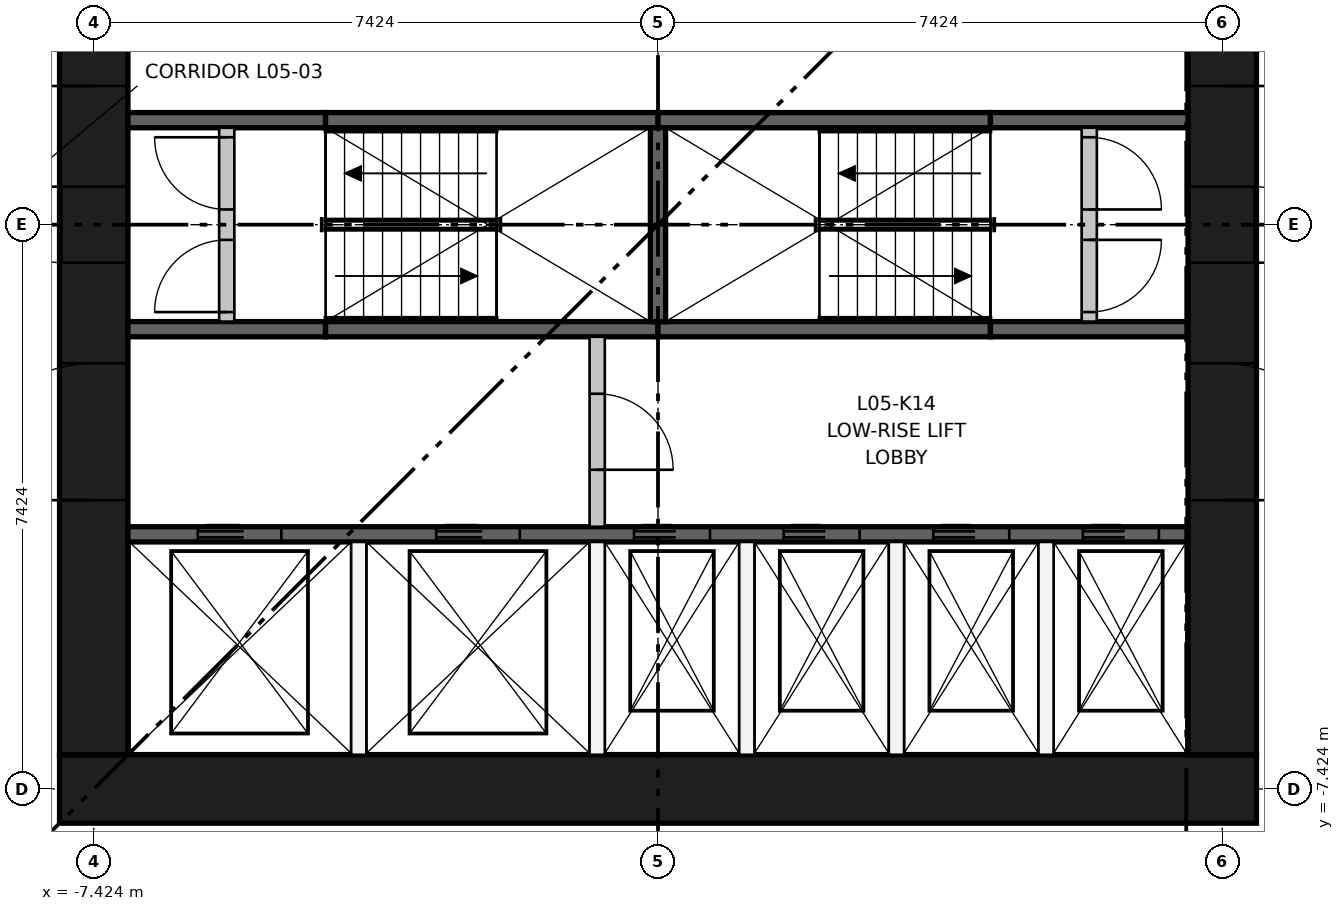
"""IFC4 building model, lengths in metres.
Left out: names, types, materials, properties, quantities, classifications, styles, units other than length and angle.
Written with IfcOpenShell. Run it as: python <this file> out.ifc"""

import sys

from ifc_helpers import new_model, si_unit, direction, frame, frame_2d, origin, place, context, subcontext, project, spatial, rectangle, extrude, element, fill, save


model = new_model("IFC4")
c1 = context("Model", 3, precision=1e-05, world=origin(), true_north=direction((0.0, 1.0)))
c2 = subcontext(c1, "Body", "Model", "MODEL_VIEW")
j1 = project(units=[si_unit("LENGTHUNIT", "METRE"), si_unit("PLANEANGLEUNIT", "RADIAN")], contexts=[c1])
p1 = place(None, origin())
s1 = spatial("IfcSite", under=j1, at=p1, CompositionType="ELEMENT")
p2 = place(p1, origin())
s2 = spatial("IfcBuilding", under=s1, at=p2, CompositionType="ELEMENT")
p3 = place(p2, frame((0.0, 0.0, 22.4)))
s3 = spatial("IfcBuildingStorey", under=s2, at=p3, CompositionType="ELEMENT", Elevation=22.4)
p4 = place(p3, frame((-7.874, -7.424, 0.0), z_axis=(0.0, 0.0, 1.0), x_axis=(1.0, 0.0, 0.0)))
e1 = element("IfcWall", 1, at=p4, inside=s3, PredefinedType="SHEAR", context=c2, shape_type="SweptSolid", body=[
    extrude(rectangle(XDim=15.748, YDim=0.9, at=frame_2d((7.874, 0.0))), origin(), (0.0, 0.0, 1.0), 3.8),
])
p5 = place(p3, frame((-7.424, -6.974, 0.0), z_axis=(0.0, 0.0, 1.0), x_axis=(0.0, 1.0, 0.0)))
e2 = element("IfcWall", 2, at=p5, inside=s3, PredefinedType="SHEAR", context=c2, shape_type="SweptSolid", body=[
    extrude(rectangle(XDim=13.948, YDim=0.9, at=frame_2d((6.974, 0.0))), origin(), (0.0, 0.0, 1.0), 3.8),
])
p6 = place(p5, frame((6.474, 0.0, 0.0)))
e3 = element("IfcOpeningElement", 3, at=p6, cuts=e2, PredefinedType="OPENING", context=c2, shape_type="SweptSolid", body=[
    extrude(rectangle(XDim=1.0, YDim=2.1, at=frame_2d((0.5, 1.05))), frame((0.0, 0.46, 0.0), z_axis=(0.0, -1.0, 0.0), x_axis=(1.0, 0.0, 0.0)), (0.0, 0.0, 1.0), 0.92),
])
p7 = place(p5, frame((3.35, 0.0, 0.0)))
e4 = element("IfcOpeningElement", 4, at=p7, cuts=e2, PredefinedType="OPENING", context=c2, shape_type="SweptSolid", body=[
    extrude(rectangle(XDim=1.8, YDim=2.1, at=frame_2d((0.9, 1.05))), frame((0.0, 0.46, 0.0), z_axis=(0.0, -1.0, 0.0), x_axis=(1.0, 0.0, 0.0)), (0.0, 0.0, 1.0), 0.92),
])
p8 = place(p5, frame((8.799, 0.0, 0.0)))
e5 = element("IfcOpeningElement", 5, at=p8, cuts=e2, PredefinedType="OPENING", context=c2, shape_type="SweptSolid", body=[
    extrude(rectangle(XDim=1.8, YDim=2.1, at=frame_2d((0.9, 1.05))), frame((0.0, 0.46, 0.0), z_axis=(0.0, -1.0, 0.0), x_axis=(1.0, 0.0, 0.0)), (0.0, 0.0, 1.0), 0.92),
])
p9 = place(p5, frame((11.974, 0.0, 0.0)))
e6 = element("IfcOpeningElement", 6, at=p9, cuts=e2, PredefinedType="OPENING", context=c2, shape_type="SweptSolid", body=[
    extrude(rectangle(XDim=1.0, YDim=2.1, at=frame_2d((0.5, 1.05))), frame((0.0, 0.46, 0.0), z_axis=(0.0, -1.0, 0.0), x_axis=(1.0, 0.0, 0.0)), (0.0, 0.0, 1.0), 0.92),
])
p10 = place(p3, frame((7.424, -6.974, 0.0), z_axis=(0.0, 0.0, 1.0), x_axis=(0.0, 1.0, 0.0)))
e7 = element("IfcWall", 7, at=p10, inside=s3, PredefinedType="SHEAR", context=c2, shape_type="SweptSolid", body=[
    extrude(rectangle(XDim=13.948, YDim=0.9, at=frame_2d((6.974, 0.0))), origin(), (0.0, 0.0, 1.0), 3.8),
])
p11 = place(p10, frame((6.474, 0.0, 0.0)))
e8 = element("IfcOpeningElement", 8, at=p11, cuts=e7, PredefinedType="OPENING", context=c2, shape_type="SweptSolid", body=[
    extrude(rectangle(XDim=1.0, YDim=2.1, at=frame_2d((0.5, 1.05))), frame((0.0, 0.46, 0.0), z_axis=(0.0, -1.0, 0.0), x_axis=(1.0, 0.0, 0.0)), (0.0, 0.0, 1.0), 0.92),
])
p12 = place(p10, frame((3.35, 0.0, 0.0)))
e9 = element("IfcOpeningElement", 9, at=p12, cuts=e7, PredefinedType="OPENING", context=c2, shape_type="SweptSolid", body=[
    extrude(rectangle(XDim=1.8, YDim=2.1, at=frame_2d((0.9, 1.05))), frame((0.0, 0.46, 0.0), z_axis=(0.0, -1.0, 0.0), x_axis=(1.0, 0.0, 0.0)), (0.0, 0.0, 1.0), 0.92),
])
p13 = place(p10, frame((8.799, 0.0, 0.0)))
e10 = element("IfcOpeningElement", 10, at=p13, cuts=e7, PredefinedType="OPENING", context=c2, shape_type="SweptSolid", body=[
    extrude(rectangle(XDim=1.8, YDim=2.1, at=frame_2d((0.9, 1.05))), frame((0.0, 0.46, 0.0), z_axis=(0.0, -1.0, 0.0), x_axis=(1.0, 0.0, 0.0)), (0.0, 0.0, 1.0), 0.92),
])
p14 = place(p3, frame((-6.974, -4.074, 0.0), z_axis=(0.0, 0.0, 1.0), x_axis=(1.0, 0.0, 0.0)))
e11 = element("IfcWall", 11, at=p14, inside=s3, PredefinedType="SHEAR", context=c2, shape_type="SweptSolid", body=[
    extrude(rectangle(XDim=13.948, YDim=0.2, at=frame_2d((6.974, 0.0))), origin(), (0.0, 0.0, 1.0), 3.45),
])
p15 = place(p14, frame((0.918, 0.0, 0.0)))
e12 = element("IfcOpeningElement", 12, at=p15, cuts=e11, PredefinedType="OPENING", context=c2, shape_type="SweptSolid", body=[
    extrude(rectangle(XDim=1.1, YDim=2.1, at=frame_2d((0.55, 1.05))), frame((0.0, 0.11, 0.0), z_axis=(0.0, -1.0, 0.0), x_axis=(1.0, 0.0, 0.0)), (0.0, 0.0, 1.0), 0.22),
])
p16 = place(p14, frame((4.055, 0.0, 0.0)))
e13 = element("IfcOpeningElement", 13, at=p16, cuts=e11, PredefinedType="OPENING", context=c2, shape_type="SweptSolid", body=[
    extrude(rectangle(XDim=1.1, YDim=2.1, at=frame_2d((0.55, 1.05))), frame((0.0, 0.11, 0.0), z_axis=(0.0, -1.0, 0.0), x_axis=(1.0, 0.0, 0.0)), (0.0, 0.0, 1.0), 0.22),
])
p17 = place(p14, frame((6.658, 0.0, 0.0)))
e14 = element("IfcOpeningElement", 14, at=p17, cuts=e11, PredefinedType="OPENING", context=c2, shape_type="SweptSolid", body=[
    extrude(rectangle(XDim=1.0, YDim=2.1, at=frame_2d((0.5, 1.05))), frame((0.0, 0.11, 0.0), z_axis=(0.0, -1.0, 0.0), x_axis=(1.0, 0.0, 0.0)), (0.0, 0.0, 1.0), 0.22),
])
p18 = place(p14, frame((8.627, 0.0, 0.0)))
e15 = element("IfcOpeningElement", 15, at=p18, cuts=e11, PredefinedType="OPENING", context=c2, shape_type="SweptSolid", body=[
    extrude(rectangle(XDim=1.0, YDim=2.1, at=frame_2d((0.5, 1.05))), frame((0.0, 0.11, 0.0), z_axis=(0.0, -1.0, 0.0), x_axis=(1.0, 0.0, 0.0)), (0.0, 0.0, 1.0), 0.22),
])
p19 = place(p14, frame((10.595, 0.0, 0.0)))
e16 = element("IfcOpeningElement", 16, at=p19, cuts=e11, PredefinedType="OPENING", context=c2, shape_type="SweptSolid", body=[
    extrude(rectangle(XDim=1.0, YDim=2.1, at=frame_2d((0.5, 1.05))), frame((0.0, 0.11, 0.0), z_axis=(0.0, -1.0, 0.0), x_axis=(1.0, 0.0, 0.0)), (0.0, 0.0, 1.0), 0.22),
])
p20 = place(p14, frame((12.564, 0.0, 0.0)))
e17 = element("IfcOpeningElement", 17, at=p20, cuts=e11, PredefinedType="OPENING", context=c2, shape_type="SweptSolid", body=[
    extrude(rectangle(XDim=1.0, YDim=2.1, at=frame_2d((0.5, 1.05))), frame((0.0, 0.11, 0.0), z_axis=(0.0, -1.0, 0.0), x_axis=(1.0, 0.0, 0.0)), (0.0, 0.0, 1.0), 0.22),
])
p21 = place(p3, frame((-6.974, -1.375, 0.0), z_axis=(0.0, 0.0, 1.0), x_axis=(1.0, 0.0, 0.0)))
e18 = element("IfcWall", 18, at=p21, inside=s3, PredefinedType="SHEAR", context=c2, shape_type="SweptSolid", body=[
    extrude(rectangle(XDim=2.6, YDim=0.2, at=frame_2d((1.3, 0.0))), origin(), (0.0, 0.0, 1.0), 3.45),
])
for number, where, z_axis, x_axis in (
    (19, (-4.374, -1.375, 0.0), (0.0, 0.0, 1.0), (1.0, 0.0, 0.0)),
    (20, (0.0, -1.375, 0.0), (0.0, 0.0, 1.0), (1.0, 0.0, 0.0)),
):
    element("IfcWall", number, at=place(p3, frame(where, z_axis=z_axis, x_axis=x_axis)), inside=s3, PredefinedType="SHEAR", context=c2, shape_type="SweptSolid", body=[
        extrude(rectangle(XDim=4.374, YDim=0.2, at=frame_2d((2.187, 0.0))), origin(), (0.0, 0.0, 1.0), 3.45),
    ])
for number, where, z_axis, x_axis in (
    (21, (4.374, -1.375, 0.0), (0.0, 0.0, 1.0), (1.0, 0.0, 0.0)),
    (22, (-6.974, 1.375, 0.0), (0.0, 0.0, 1.0), (1.0, 0.0, 0.0)),
):
    element("IfcWall", number, at=place(p3, frame(where, z_axis=z_axis, x_axis=x_axis)), inside=s3, PredefinedType="SHEAR", context=c2, shape_type="SweptSolid", body=[
        extrude(rectangle(XDim=2.6, YDim=0.2, at=frame_2d((1.3, 0.0))), origin(), (0.0, 0.0, 1.0), 3.45),
    ])
for number, where, z_axis, x_axis in (
    (23, (-4.374, 1.375, 0.0), (0.0, 0.0, 1.0), (1.0, 0.0, 0.0)),
    (24, (0.0, 1.375, 0.0), (0.0, 0.0, 1.0), (1.0, 0.0, 0.0)),
):
    element("IfcWall", number, at=place(p3, frame(where, z_axis=z_axis, x_axis=x_axis)), inside=s3, PredefinedType="SHEAR", context=c2, shape_type="SweptSolid", body=[
        extrude(rectangle(XDim=4.374, YDim=0.2, at=frame_2d((2.187, 0.0))), origin(), (0.0, 0.0, 1.0), 3.45),
    ])
p22 = place(p3, frame((4.374, 1.375, 0.0), z_axis=(0.0, 0.0, 1.0), x_axis=(1.0, 0.0, 0.0)))
e25 = element("IfcWall", 25, at=p22, inside=s3, PredefinedType="SHEAR", context=c2, shape_type="SweptSolid", body=[
    extrude(rectangle(XDim=2.6, YDim=0.2, at=frame_2d((1.3, 0.0))), origin(), (0.0, 0.0, 1.0), 3.45),
])
p23 = place(p3, frame((0.0, -1.275, 0.0), z_axis=(0.0, 0.0, 1.0), x_axis=(0.0, 1.0, 0.0)))
e26 = element("IfcWall", 26, at=p23, inside=s3, PredefinedType="SHEAR", context=c2, shape_type="SweptSolid", body=[
    extrude(rectangle(XDim=2.55, YDim=0.2, at=frame_2d((1.275, 0.0))), origin(), (0.0, 0.0, 1.0), 3.45),
])
for number, where, z_axis, x_axis in (
    (27, (-3.937, -6.974, 0.0), (0.0, 0.0, 1.0), (0.0, 1.0, 0.0)),
    (28, (-0.8, -6.974, 0.0), (0.0, 0.0, 1.0), (0.0, 1.0, 0.0)),
):
    element("IfcWall", number, at=place(p3, frame(where, z_axis=z_axis, x_axis=x_axis)), inside=s3, PredefinedType="PARTITIONING", context=c2, shape_type="SweptSolid", body=[
        extrude(rectangle(XDim=2.8, YDim=0.2, at=frame_2d((1.4, 0.0))), origin(), (0.0, 0.0, 1.0), 3.45),
    ])
p24 = place(p3, frame((-0.8, -3.974, 0.0), z_axis=(0.0, 0.0, 1.0), x_axis=(0.0, 1.0, 0.0)))
e29 = element("IfcWall", 29, at=p24, inside=s3, PredefinedType="PARTITIONING", context=c2, shape_type="SweptSolid", body=[
    extrude(rectangle(XDim=2.499, YDim=0.2, at=frame_2d((1.25, 0.0))), origin(), (0.0, 0.0, 1.0), 3.45),
])
p25 = place(p24, frame((0.75, 0.0, 0.0)))
e30 = element("IfcOpeningElement", 30, at=p25, cuts=e29, PredefinedType="OPENING", context=c2, shape_type="SweptSolid", body=[
    extrude(rectangle(XDim=1.0, YDim=2.1, at=frame_2d((0.5, 1.05))), frame((0.0, 0.11, 0.0), z_axis=(0.0, -1.0, 0.0), x_axis=(1.0, 0.0, 0.0)), (0.0, 0.0, 1.0), 0.22),
])
for number, where, z_axis, x_axis in (
    (31, (1.168, -6.974, 0.0), (0.0, 0.0, 1.0), (0.0, 1.0, 0.0)),
    (32, (3.137, -6.974, 0.0), (0.0, 0.0, 1.0), (0.0, 1.0, 0.0)),
    (33, (5.105, -6.974, 0.0), (0.0, 0.0, 1.0), (0.0, 1.0, 0.0)),
):
    element("IfcWall", number, at=place(p3, frame(where, z_axis=z_axis, x_axis=x_axis)), inside=s3, PredefinedType="PARTITIONING", context=c2, shape_type="SweptSolid", body=[
        extrude(rectangle(XDim=2.8, YDim=0.2, at=frame_2d((1.4, 0.0))), origin(), (0.0, 0.0, 1.0), 3.45),
    ])
p26 = place(p3, frame((-5.674, -1.275, 0.0), z_axis=(0.0, 0.0, 1.0), x_axis=(0.0, 1.0, 0.0)))
e34 = element("IfcWall", 34, at=p26, inside=s3, PredefinedType="PARTITIONING", context=c2, shape_type="SweptSolid", body=[
    extrude(rectangle(XDim=2.55, YDim=0.2, at=frame_2d((1.275, 0.0))), origin(), (0.0, 0.0, 1.0), 3.45),
])
p27 = place(p26, frame((0.125, 0.0, 0.0)))
e35 = element("IfcOpeningElement", 35, at=p27, cuts=e34, PredefinedType="OPENING", context=c2, shape_type="SweptSolid", body=[
    extrude(rectangle(XDim=0.95, YDim=2.1, at=frame_2d((0.475, 1.05))), frame((0.0, 0.11, 0.0), z_axis=(0.0, -1.0, 0.0), x_axis=(1.0, 0.0, 0.0)), (0.0, 0.0, 1.0), 0.22),
])
p28 = place(p26, frame((1.475, 0.0, 0.0)))
e36 = element("IfcOpeningElement", 36, at=p28, cuts=e34, PredefinedType="OPENING", context=c2, shape_type="SweptSolid", body=[
    extrude(rectangle(XDim=0.95, YDim=2.1, at=frame_2d((0.475, 1.05))), frame((0.0, 0.11, 0.0), z_axis=(0.0, -1.0, 0.0), x_axis=(1.0, 0.0, 0.0)), (0.0, 0.0, 1.0), 0.22),
])
p29 = place(p3, frame((5.674, -1.275, 0.0), z_axis=(0.0, 0.0, 1.0), x_axis=(0.0, 1.0, 0.0)))
e37 = element("IfcWall", 37, at=p29, inside=s3, PredefinedType="PARTITIONING", context=c2, shape_type="SweptSolid", body=[
    extrude(rectangle(XDim=2.55, YDim=0.2, at=frame_2d((1.275, 0.0))), origin(), (0.0, 0.0, 1.0), 3.45),
])
p30 = place(p29, frame((0.125, 0.0, 0.0)))
e38 = element("IfcOpeningElement", 38, at=p30, cuts=e37, PredefinedType="OPENING", context=c2, shape_type="SweptSolid", body=[
    extrude(rectangle(XDim=0.95, YDim=2.1, at=frame_2d((0.475, 1.05))), frame((0.0, 0.11, 0.0), z_axis=(0.0, -1.0, 0.0), x_axis=(1.0, 0.0, 0.0)), (0.0, 0.0, 1.0), 0.22),
])
p31 = place(p29, frame((1.475, 0.0, 0.0)))
e39 = element("IfcOpeningElement", 39, at=p31, cuts=e37, PredefinedType="OPENING", context=c2, shape_type="SweptSolid", body=[
    extrude(rectangle(XDim=0.95, YDim=2.1, at=frame_2d((0.475, 1.05))), frame((0.0, 0.11, 0.0), z_axis=(0.0, -1.0, 0.0), x_axis=(1.0, 0.0, 0.0)), (0.0, 0.0, 1.0), 0.22),
])
p32 = place(p15, origin())
e40 = element("IfcDoor", 40, at=p32, inside=s3, OperationType="DOUBLE_DOOR_SLIDING", PredefinedType="DOOR", context=c2, shape_type="SweptSolid", body=[
    extrude(rectangle(XDim=1.1, YDim=2.1, at=frame_2d((0.55, 1.05))), frame((0.0, 0.025, 0.0), z_axis=(0.0, -1.0, 0.0), x_axis=(1.0, 0.0, 0.0)), (0.0, 0.0, 1.0), 0.05),
])
fill(e12, e40)
p33 = place(p16, origin())
e41 = element("IfcDoor", 41, at=p33, inside=s3, OperationType="DOUBLE_DOOR_SLIDING", PredefinedType="DOOR", context=c2, shape_type="SweptSolid", body=[
    extrude(rectangle(XDim=1.1, YDim=2.1, at=frame_2d((0.55, 1.05))), frame((0.0, 0.025, 0.0), z_axis=(0.0, -1.0, 0.0), x_axis=(1.0, 0.0, 0.0)), (0.0, 0.0, 1.0), 0.05),
])
fill(e13, e41)
p34 = place(p17, origin())
e42 = element("IfcDoor", 42, at=p34, inside=s3, OperationType="DOUBLE_DOOR_SLIDING", PredefinedType="DOOR", context=c2, shape_type="SweptSolid", body=[
    extrude(rectangle(XDim=1.0, YDim=2.1, at=frame_2d((0.5, 1.05))), frame((0.0, 0.025, 0.0), z_axis=(0.0, -1.0, 0.0), x_axis=(1.0, 0.0, 0.0)), (0.0, 0.0, 1.0), 0.05),
])
fill(e14, e42)
p35 = place(p18, origin())
e43 = element("IfcDoor", 43, at=p35, inside=s3, OperationType="DOUBLE_DOOR_SLIDING", PredefinedType="DOOR", context=c2, shape_type="SweptSolid", body=[
    extrude(rectangle(XDim=1.0, YDim=2.1, at=frame_2d((0.5, 1.05))), frame((0.0, 0.025, 0.0), z_axis=(0.0, -1.0, 0.0), x_axis=(1.0, 0.0, 0.0)), (0.0, 0.0, 1.0), 0.05),
])
fill(e15, e43)
p36 = place(p19, origin())
e44 = element("IfcDoor", 44, at=p36, inside=s3, OperationType="DOUBLE_DOOR_SLIDING", PredefinedType="DOOR", context=c2, shape_type="SweptSolid", body=[
    extrude(rectangle(XDim=1.0, YDim=2.1, at=frame_2d((0.5, 1.05))), frame((0.0, 0.025, 0.0), z_axis=(0.0, -1.0, 0.0), x_axis=(1.0, 0.0, 0.0)), (0.0, 0.0, 1.0), 0.05),
])
fill(e16, e44)
p37 = place(p20, origin())
e45 = element("IfcDoor", 45, at=p37, inside=s3, OperationType="DOUBLE_DOOR_SLIDING", PredefinedType="DOOR", context=c2, shape_type="SweptSolid", body=[
    extrude(rectangle(XDim=1.0, YDim=2.1, at=frame_2d((0.5, 1.05))), frame((0.0, 0.025, 0.0), z_axis=(0.0, -1.0, 0.0), x_axis=(1.0, 0.0, 0.0)), (0.0, 0.0, 1.0), 0.05),
])
fill(e17, e45)
p38 = place(p27, origin())
e46 = element("IfcDoor", 46, at=p38, inside=s3, OperationType="SINGLE_SWING_LEFT", PredefinedType="DOOR", context=c2, shape_type="SweptSolid", body=[
    extrude(rectangle(XDim=0.95, YDim=2.1, at=frame_2d((0.475, 1.05))), frame((0.0, 0.025, 0.0), z_axis=(0.0, -1.0, 0.0), x_axis=(1.0, 0.0, 0.0)), (0.0, 0.0, 1.0), 0.05),
])
fill(e35, e46)
p39 = place(p28, origin())
e47 = element("IfcDoor", 47, at=p39, inside=s3, OperationType="SINGLE_SWING_RIGHT", PredefinedType="DOOR", context=c2, shape_type="SweptSolid", body=[
    extrude(rectangle(XDim=0.95, YDim=2.1, at=frame_2d((0.475, 1.05))), frame((0.0, 0.025, 0.0), z_axis=(0.0, -1.0, 0.0), x_axis=(1.0, 0.0, 0.0)), (0.0, 0.0, 1.0), 0.05),
])
fill(e36, e47)
p40 = place(p30, frame((0.95, 0.0, 0.0), z_axis=(0.0, 0.0, 1.0), x_axis=(-1.0, 0.0, 0.0)))
e48 = element("IfcDoor", 48, at=p40, inside=s3, OperationType="SINGLE_SWING_RIGHT", PredefinedType="DOOR", context=c2, shape_type="SweptSolid", body=[
    extrude(rectangle(XDim=0.95, YDim=2.1, at=frame_2d((0.475, 1.05))), frame((0.0, 0.025, 0.0), z_axis=(0.0, -1.0, 0.0), x_axis=(1.0, 0.0, 0.0)), (0.0, 0.0, 1.0), 0.05),
])
fill(e38, e48)
p41 = place(p31, frame((0.95, 0.0, 0.0), z_axis=(0.0, 0.0, 1.0), x_axis=(-1.0, 0.0, 0.0)))
e49 = element("IfcDoor", 49, at=p41, inside=s3, OperationType="SINGLE_SWING_LEFT", PredefinedType="DOOR", context=c2, shape_type="SweptSolid", body=[
    extrude(rectangle(XDim=0.95, YDim=2.1, at=frame_2d((0.475, 1.05))), frame((0.0, 0.025, 0.0), z_axis=(0.0, -1.0, 0.0), x_axis=(1.0, 0.0, 0.0)), (0.0, 0.0, 1.0), 0.05),
])
fill(e39, e49)
p42 = place(p25, frame((1.0, 0.0, 0.0), z_axis=(0.0, 0.0, 1.0), x_axis=(-1.0, 0.0, 0.0)))
e50 = element("IfcDoor", 50, at=p42, inside=s3, OperationType="SINGLE_SWING_LEFT", PredefinedType="DOOR", context=c2, shape_type="SweptSolid", body=[
    extrude(rectangle(XDim=1.0, YDim=2.1, at=frame_2d((0.5, 1.05))), frame((0.0, 0.025, 0.0), z_axis=(0.0, -1.0, 0.0), x_axis=(1.0, 0.0, 0.0)), (0.0, 0.0, 1.0), 0.05),
])
fill(e30, e50)
p43 = place(p6, origin())
e51 = element("IfcDoor", 51, at=p43, inside=s3, OperationType="SINGLE_SWING_RIGHT", PredefinedType="DOOR", context=c2, shape_type="SweptSolid", body=[
    extrude(rectangle(XDim=1.0, YDim=2.1, at=frame_2d((0.5, 1.05))), frame((0.0, 0.45, 0.0), z_axis=(0.0, -1.0, 0.0), x_axis=(1.0, 0.0, 0.0)), (0.0, 0.0, 1.0), 0.05),
])
fill(e3, e51)
p44 = place(p7, origin())
e52 = element("IfcDoor", 52, at=p44, inside=s3, OperationType="DOUBLE_DOOR_SINGLE_SWING", PredefinedType="DOOR", context=c2, shape_type="SweptSolid", body=[
    extrude(rectangle(XDim=1.8, YDim=2.1, at=frame_2d((0.9, 1.05))), frame((0.0, 0.025, 0.0), z_axis=(0.0, -1.0, 0.0), x_axis=(1.0, 0.0, 0.0)), (0.0, 0.0, 1.0), 0.05),
])
fill(e4, e52)
p45 = place(p8, origin())
e53 = element("IfcDoor", 53, at=p45, inside=s3, OperationType="DOUBLE_DOOR_SINGLE_SWING", PredefinedType="DOOR", context=c2, shape_type="SweptSolid", body=[
    extrude(rectangle(XDim=1.8, YDim=2.1, at=frame_2d((0.9, 1.05))), frame((0.0, 0.025, 0.0), z_axis=(0.0, -1.0, 0.0), x_axis=(1.0, 0.0, 0.0)), (0.0, 0.0, 1.0), 0.05),
])
fill(e5, e53)
p46 = place(p11, frame((1.0, 0.0, 0.0), z_axis=(0.0, 0.0, 1.0), x_axis=(-1.0, 0.0, 0.0)))
e54 = element("IfcDoor", 54, at=p46, inside=s3, OperationType="SINGLE_SWING_LEFT", PredefinedType="DOOR", context=c2, shape_type="SweptSolid", body=[
    extrude(rectangle(XDim=1.0, YDim=2.1, at=frame_2d((0.5, 1.05))), frame((0.0, 0.45, 0.0), z_axis=(0.0, -1.0, 0.0), x_axis=(1.0, 0.0, 0.0)), (0.0, 0.0, 1.0), 0.05),
])
fill(e8, e54)
p47 = place(p12, frame((1.8, 0.0, 0.0), z_axis=(0.0, 0.0, 1.0), x_axis=(-1.0, 0.0, 0.0)))
e55 = element("IfcDoor", 55, at=p47, inside=s3, OperationType="DOUBLE_DOOR_SINGLE_SWING", PredefinedType="DOOR", context=c2, shape_type="SweptSolid", body=[
    extrude(rectangle(XDim=1.8, YDim=2.1, at=frame_2d((0.9, 1.05))), frame((0.0, 0.025, 0.0), z_axis=(0.0, -1.0, 0.0), x_axis=(1.0, 0.0, 0.0)), (0.0, 0.0, 1.0), 0.05),
])
fill(e9, e55)
p48 = place(p13, frame((1.8, 0.0, 0.0), z_axis=(0.0, 0.0, 1.0), x_axis=(-1.0, 0.0, 0.0)))
e56 = element("IfcDoor", 56, at=p48, inside=s3, OperationType="DOUBLE_DOOR_SINGLE_SWING", PredefinedType="DOOR", context=c2, shape_type="SweptSolid", body=[
    extrude(rectangle(XDim=1.8, YDim=2.1, at=frame_2d((0.9, 1.05))), frame((0.0, 0.025, 0.0), z_axis=(0.0, -1.0, 0.0), x_axis=(1.0, 0.0, 0.0)), (0.0, 0.0, 1.0), 0.05),
])
fill(e10, e56)
save(model, sys.argv[1])
